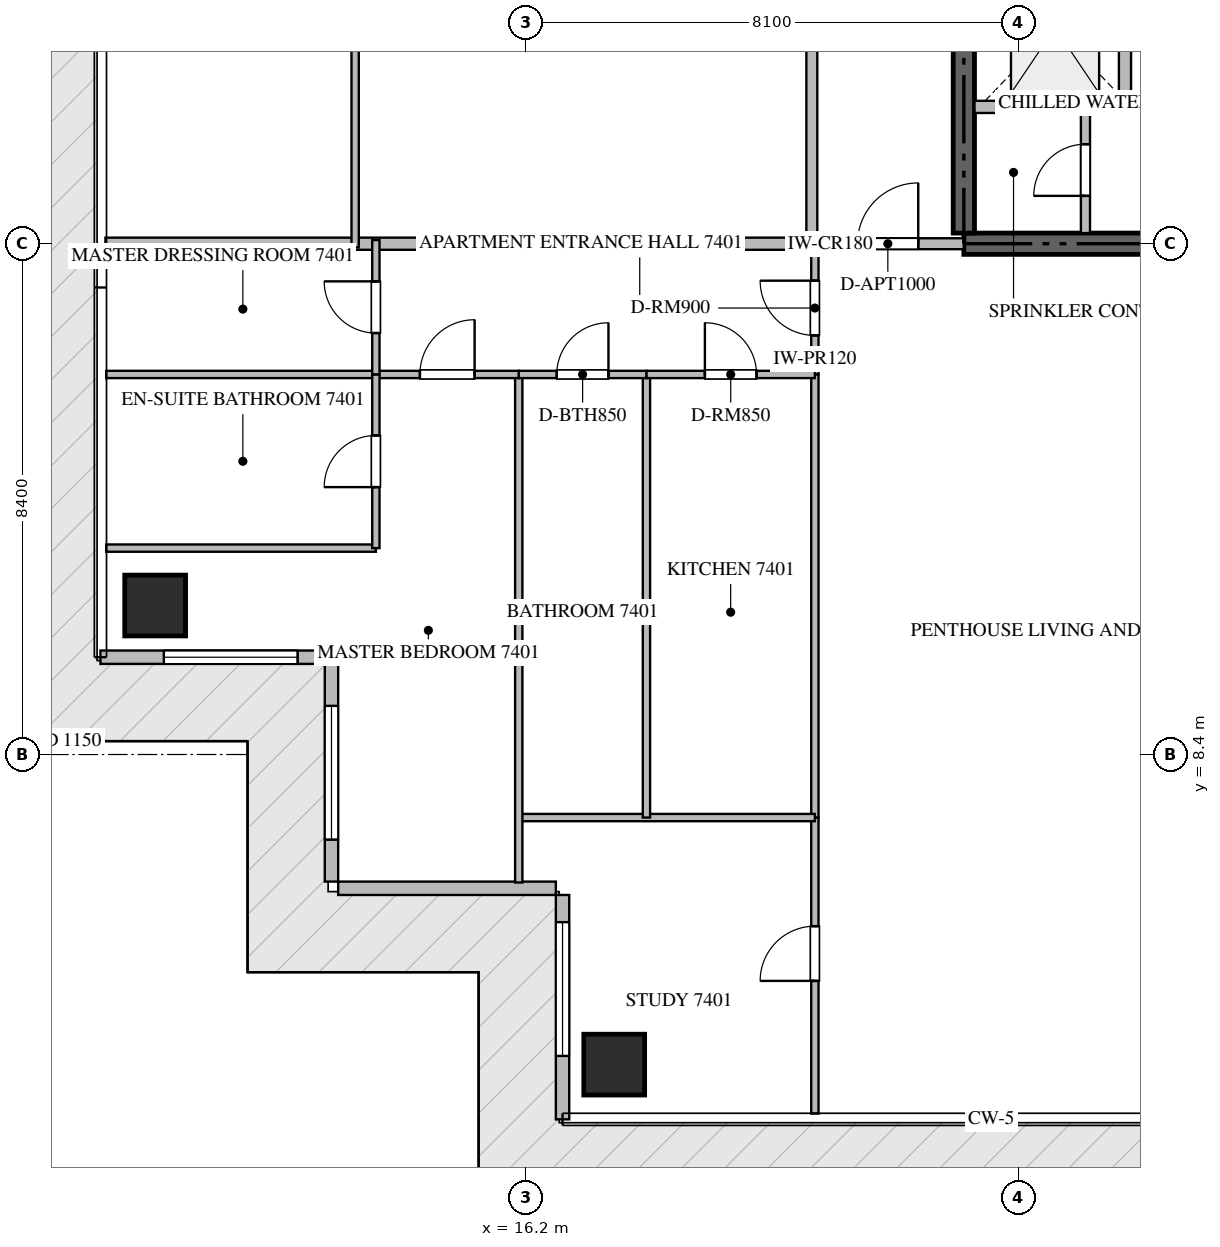
"""IFC4 building model, lengths in metres.
Left out: names, types, materials, properties, quantities, classifications, styles, units other than length and angle.
Written with IfcOpenShell. Run it as: python <this file> out.ifc"""

import sys

from ifc_helpers import new_model, si_unit, direction, frame, frame_2d, origin, origin_2d, place, context, subcontext, project, spatial, rectangle, extrude, source, transform, mapped, element, fill, save


model = new_model("IFC4")
c1 = context("Model", 3, precision=1e-05, world=origin(), true_north=direction((0.0, 1.0)))
c2 = subcontext(c1, "Body", "Model", "MODEL_VIEW")
j1 = project(units=[si_unit("LENGTHUNIT", "METRE"), si_unit("PLANEANGLEUNIT", "RADIAN")], contexts=[c1])
p1 = place(None, origin())
s1 = spatial("IfcSite", under=j1, at=p1, CompositionType="ELEMENT")
p2 = place(p1, origin())
s2 = spatial("IfcBuilding", under=s1, at=p2, CompositionType="ELEMENT")
p3 = place(p2, frame((0.0, 0.0, 297.5)))
s3 = spatial("IfcBuildingStorey", under=s2, at=p3, CompositionType="ELEMENT", Elevation=297.5)
p4 = place(p3, frame((23.4, 16.8, -0.26), z_axis=(0.0, 0.0, 1.0), x_axis=(1.0, 0.0, 0.0)))
e1 = element("IfcWall", 1, at=p4, inside=s3, PredefinedType="SHEAR", context=c2, shape_type="SweptSolid", body=[
    extrude(rectangle(XDim=18.0, YDim=0.35, at=frame_2d((9.0, 0.0))), origin(), (0.0, 0.0, 1.0), 4.048),
])
p5 = place(p3, frame((23.4, 16.975, -0.26), z_axis=(0.0, 0.0, 1.0), x_axis=(0.0, 1.0, 0.0)))
e2 = element("IfcWall", 2, at=p5, inside=s3, PredefinedType="SHEAR", context=c2, shape_type="SweptSolid", body=[
    extrude(rectangle(XDim=4.875, YDim=0.35, at=frame_2d((2.438, 0.0))), origin(), (0.0, 0.0, 1.0), 4.048),
])
m1 = source(origin(), c2, "Body", "SweptSolid", [
    extrude(rectangle(XDim=1.0, YDim=1.0, at=origin_2d()), origin(), (0.0, 0.0, 1.0), 4.05),
])
for number, where, z_axis, x_axis in (
    (3, (17.65, 3.3, -0.26), (0.0, 0.0, 1.0), (1.0, 0.0, 0.0)),
    (4, (10.1, 10.85, -0.26), (0.0, 0.0, 1.0), (1.0, 0.0, 0.0)),
):
    element("IfcColumn", number, at=place(p3, frame(where, z_axis=z_axis, x_axis=x_axis)), inside=s3, PredefinedType="COLUMN", context=c2, shape_type="MappedRepresentation", body=[
        mapped(m1, transform((0.0, 0.0, 0.0), scale=1.0)),
    ])
p6 = place(p3, frame((9.2, 10.0, 0.0), z_axis=(0.0, 0.0, 1.0), x_axis=(1.0, 0.0, 0.0)))
e5 = element("IfcWall", 5, at=p6, inside=s3, PredefinedType="ELEMENTEDWALL", context=c2, shape_type="SweptSolid", body=[
    extrude(rectangle(XDim=3.69, YDim=0.22, at=frame_2d((1.845, 0.0))), origin(), (0.0, 0.0, 1.0), 3.775),
])
p7 = place(p6, frame((1.043, 0.0, 0.65)))
e6 = element("IfcOpeningElement", 6, at=p7, cuts=e5, PredefinedType="OPENING", context=c2, shape_type="SweptSolid", body=[
    extrude(rectangle(XDim=2.2, YDim=2.4, at=frame_2d((1.1, 1.2))), frame((0.0, 0.12, 0.0), z_axis=(0.0, -1.0, 0.0), x_axis=(1.0, 0.0, 0.0)), (0.0, 0.0, 1.0), 0.24),
])
p8 = place(p3, frame((13.0, 9.89, 0.0), z_axis=(0.0, 0.0, 1.0), x_axis=(0.0, -1.0, 0.0)))
e7 = element("IfcWall", 7, at=p8, inside=s3, PredefinedType="ELEMENTEDWALL", context=c2, shape_type="SweptSolid", body=[
    extrude(rectangle(XDim=3.58, YDim=0.22, at=frame_2d((1.79, 0.0))), origin(), (0.0, 0.0, 1.0), 3.775),
])
p9 = place(p8, frame((0.69, 0.0, 0.65)))
e8 = element("IfcOpeningElement", 8, at=p9, cuts=e7, PredefinedType="OPENING", context=c2, shape_type="SweptSolid", body=[
    extrude(rectangle(XDim=2.2, YDim=2.4, at=frame_2d((1.1, 1.2))), frame((0.0, 0.12, 0.0), z_axis=(0.0, -1.0, 0.0), x_axis=(1.0, 0.0, 0.0)), (0.0, 0.0, 1.0), 0.24),
])
p10 = place(p3, frame((13.11, 6.2, 0.0), z_axis=(0.0, 0.0, 1.0), x_axis=(1.0, 0.0, 0.0)))
e9 = element("IfcWall", 9, at=p10, inside=s3, PredefinedType="ELEMENTEDWALL", context=c2, shape_type="SweptSolid", body=[
    extrude(rectangle(XDim=3.58, YDim=0.22, at=frame_2d((1.79, 0.0))), origin(), (0.0, 0.0, 1.0), 3.775),
])
p11 = place(p3, frame((16.8, 6.09, 0.0), z_axis=(0.0, 0.0, 1.0), x_axis=(0.0, -1.0, 0.0)))
e10 = element("IfcWall", 10, at=p11, inside=s3, PredefinedType="ELEMENTEDWALL", context=c2, shape_type="SweptSolid", body=[
    extrude(rectangle(XDim=3.69, YDim=0.22, at=frame_2d((1.845, 0.0))), origin(), (0.0, 0.0, 1.0), 3.775),
])
p12 = place(p11, frame((0.447, 0.0, 0.65)))
e11 = element("IfcOpeningElement", 11, at=p12, cuts=e10, PredefinedType="OPENING", context=c2, shape_type="SweptSolid", body=[
    extrude(rectangle(XDim=2.2, YDim=2.4, at=frame_2d((1.1, 1.2))), frame((0.0, 0.12, 0.0), z_axis=(0.0, -1.0, 0.0), x_axis=(1.0, 0.0, 0.0)), (0.0, 0.0, 1.0), 0.24),
])
p13 = place(p3, frame((26.05, 19.05, 0.0), z_axis=(0.0, 0.0, 1.0), x_axis=(0.0, 1.0, 0.0)))
e12 = element("IfcWall", 12, at=p13, inside=s3, PredefinedType="STANDARD", context=c2, shape_type="SweptSolid", body=[
    extrude(rectangle(XDim=2.5, YDim=0.2, at=frame_2d((1.25, 0.0))), origin(), (0.0, 0.0, 1.0), 3.79),
])
p14 = place(p3, frame((23.575, 19.05, 0.0), z_axis=(0.0, 0.0, 1.0), x_axis=(1.0, 0.0, 0.0)))
e13 = element("IfcWall", 13, at=p14, inside=s3, PredefinedType="STANDARD", context=c2, shape_type="SweptSolid", body=[
    extrude(rectangle(XDim=2.475, YDim=0.2, at=frame_2d((1.238, 0.0))), origin(), (0.0, 0.0, 1.0), 3.79),
])
p15 = place(p3, frame((25.4, 16.975, 0.0), z_axis=(0.0, 0.0, 1.0), x_axis=(0.0, 1.0, 0.0)))
e14 = element("IfcWall", 14, at=p15, inside=s3, PredefinedType="PARTITIONING", context=c2, shape_type="SweptSolid", body=[
    extrude(rectangle(XDim=2.075, YDim=0.15, at=frame_2d((1.038, 0.0))), origin(), (0.0, 0.0, 1.0), 3.79),
])
p16 = place(p15, frame((0.612, 0.0, 0.0)))
e15 = element("IfcOpeningElement", 15, at=p16, cuts=e14, PredefinedType="OPENING", context=c2, shape_type="SweptSolid", body=[
    extrude(rectangle(XDim=0.85, YDim=2.1, at=frame_2d((0.425, 1.05))), frame((0.0, 0.085, 0.0), z_axis=(0.0, -1.0, 0.0), x_axis=(1.0, 0.0, 0.0)), (0.0, 0.0, 1.0), 0.17),
])
p17 = place(p3, frame((9.282, 16.8, 0.0), z_axis=(0.0, 0.0, 1.0), x_axis=(1.0, 0.0, 0.0)))
e16 = element("IfcWall", 16, at=p17, inside=s3, PredefinedType="PARTITIONING", context=c2, shape_type="SweptSolid", body=[
    extrude(rectangle(XDim=11.618, YDim=0.2, at=frame_2d((5.809, 0.0))), origin(), (0.0, 0.0, 1.0), 3.79),
])
p18 = place(p3, frame((20.902, 16.8, 0.0), z_axis=(0.0, 0.0, 1.0), x_axis=(1.0, 0.0, 0.0)))
e17 = element("IfcWall", 17, at=p18, inside=s3, PredefinedType="PARTITIONING", context=c2, shape_type="SweptSolid", body=[
    extrude(rectangle(XDim=2.496, YDim=0.18, at=frame_2d((1.248, 0.0))), origin(), (0.0, 0.0, 1.0), 3.79),
])
p19 = place(p18, frame((0.748, 0.0, 0.0)))
e18 = element("IfcOpeningElement", 18, at=p19, cuts=e17, PredefinedType="OPENING", context=c2, shape_type="SweptSolid", body=[
    extrude(rectangle(XDim=1.0, YDim=2.15, at=frame_2d((0.5, 1.075))), frame((0.0, 0.1, 0.0), z_axis=(0.0, -1.0, 0.0), x_axis=(1.0, 0.0, 0.0)), (0.0, 0.0, 1.0), 0.2),
])
p20 = place(p3, frame((20.9, 16.8, 0.0), z_axis=(0.0, 0.0, 1.0), x_axis=(0.0, 1.0, 0.0)))
e19 = element("IfcWall", 19, at=p20, inside=s3, PredefinedType="PARTITIONING", context=c2, shape_type="SweptSolid", body=[
    extrude(rectangle(XDim=16.8, YDim=0.18, at=frame_2d((8.4, 0.0))), origin(), (0.0, 0.0, 1.0), 3.79),
])
p21 = place(p20, frame((14.5, 0.0, 0.0)))
e20 = element("IfcOpeningElement", 20, at=p21, cuts=e19, PredefinedType="OPENING", context=c2, shape_type="SweptSolid", body=[
    extrude(rectangle(XDim=1.0, YDim=2.15, at=frame_2d((0.5, 1.075))), frame((0.0, 0.1, 0.0), z_axis=(0.0, -1.0, 0.0), x_axis=(1.0, 0.0, 0.0)), (0.0, 0.0, 1.0), 0.2),
])
p22 = place(p3, frame((20.95, 14.65, 0.0), z_axis=(0.0, 0.0, 1.0), x_axis=(0.0, 1.0, 0.0)))
e21 = element("IfcWall", 21, at=p22, inside=s3, PredefinedType="PARTITIONING", context=c2, shape_type="SweptSolid", body=[
    extrude(rectangle(XDim=2.148, YDim=0.12, at=frame_2d((1.074, 0.0))), origin(), (0.0, 0.0, 1.0), 3.79),
])
p23 = place(p22, frame((0.642, 0.0, 0.0)))
e22 = element("IfcOpeningElement", 22, at=p23, cuts=e21, PredefinedType="OPENING", context=c2, shape_type="SweptSolid", body=[
    extrude(rectangle(XDim=0.9, YDim=2.1, at=frame_2d((0.45, 1.05))), frame((0.0, 0.07, 0.0), z_axis=(0.0, -1.0, 0.0), x_axis=(1.0, 0.0, 0.0)), (0.0, 0.0, 1.0), 0.14),
])
p24 = place(p3, frame((20.95, 2.495, 0.0), z_axis=(0.0, 0.0, 1.0), x_axis=(0.0, 1.0, 0.0)))
e23 = element("IfcWall", 23, at=p24, inside=s3, PredefinedType="PARTITIONING", context=c2, shape_type="SweptSolid", body=[
    extrude(rectangle(XDim=4.868, YDim=0.12, at=frame_2d((2.434, 0.0))), origin(), (0.0, 0.0, 1.0), 3.79),
])
p25 = place(p24, frame((2.182, 0.0, 0.0)))
e24 = element("IfcOpeningElement", 24, at=p25, cuts=e23, PredefinedType="OPENING", context=c2, shape_type="SweptSolid", body=[
    extrude(rectangle(XDim=0.9, YDim=2.1, at=frame_2d((0.45, 1.05))), frame((0.0, 0.07, 0.0), z_axis=(0.0, -1.0, 0.0), x_axis=(1.0, 0.0, 0.0)), (0.0, 0.0, 1.0), 0.14),
])
p26 = place(p3, frame((20.95, 7.365, 0.0), z_axis=(0.0, 0.0, 1.0), x_axis=(0.0, 1.0, 0.0)))
e25 = element("IfcWall", 25, at=p26, inside=s3, PredefinedType="PARTITIONING", context=c2, shape_type="SweptSolid", body=[
    extrude(rectangle(XDim=7.283, YDim=0.12, at=frame_2d((3.642, 0.0))), origin(), (0.0, 0.0, 1.0), 3.79),
])
p27 = place(p3, frame((16.08, 7.363, 0.0), z_axis=(0.0, 0.0, 1.0), x_axis=(1.0, 0.0, 0.0)))
e26 = element("IfcWall", 26, at=p27, inside=s3, PredefinedType="PARTITIONING", context=c2, shape_type="SweptSolid", body=[
    extrude(rectangle(XDim=4.87, YDim=0.12, at=frame_2d((2.435, 0.0))), origin(), (0.0, 0.0, 1.0), 3.79),
])
p28 = place(p3, frame((16.08, 6.295, 0.0), z_axis=(0.0, 0.0, 1.0), x_axis=(0.0, 1.0, 0.0)))
e27 = element("IfcWall", 27, at=p28, inside=s3, PredefinedType="PARTITIONING", context=c2, shape_type="SweptSolid", body=[
    extrude(rectangle(XDim=8.355, YDim=0.12, at=frame_2d((4.177, 0.0))), origin(), (0.0, 0.0, 1.0), 3.79),
])
p29 = place(p3, frame((18.18, 7.363, 0.0), z_axis=(0.0, 0.0, 1.0), x_axis=(0.0, 1.0, 0.0)))
e28 = element("IfcWall", 28, at=p29, inside=s3, PredefinedType="PARTITIONING", context=c2, shape_type="SweptSolid", body=[
    extrude(rectangle(XDim=7.287, YDim=0.12, at=frame_2d((3.644, 0.0))), origin(), (0.0, 0.0, 1.0), 3.79),
])
p30 = place(p3, frame((16.08, 14.65, 0.0), z_axis=(0.0, 0.0, 1.0), x_axis=(1.0, 0.0, 0.0)))
e29 = element("IfcWall", 29, at=p30, inside=s3, PredefinedType="PARTITIONING", context=c2, shape_type="SweptSolid", body=[
    extrude(rectangle(XDim=2.1, YDim=0.12, at=frame_2d((1.05, 0.0))), origin(), (0.0, 0.0, 1.0), 3.79),
])
p31 = place(p30, frame((0.625, 0.0, 0.0)))
e30 = element("IfcOpeningElement", 30, at=p31, cuts=e29, PredefinedType="OPENING", context=c2, shape_type="SweptSolid", body=[
    extrude(rectangle(XDim=0.85, YDim=2.1, at=frame_2d((0.425, 1.05))), frame((0.0, 0.07, 0.0), z_axis=(0.0, -1.0, 0.0), x_axis=(1.0, 0.0, 0.0)), (0.0, 0.0, 1.0), 0.14),
])
p32 = place(p3, frame((18.182, 14.65, 0.0), z_axis=(0.0, 0.0, 1.0), x_axis=(1.0, 0.0, 0.0)))
e31 = element("IfcWall", 31, at=p32, inside=s3, PredefinedType="PARTITIONING", context=c2, shape_type="SweptSolid", body=[
    extrude(rectangle(XDim=2.768, YDim=0.12, at=frame_2d((1.384, 0.0))), origin(), (0.0, 0.0, 1.0), 3.79),
])
p33 = place(p32, frame((0.959, 0.0, 0.0)))
e32 = element("IfcOpeningElement", 32, at=p33, cuts=e31, PredefinedType="OPENING", context=c2, shape_type="SweptSolid", body=[
    extrude(rectangle(XDim=0.85, YDim=2.1, at=frame_2d((0.425, 1.05))), frame((0.0, 0.07, 0.0), z_axis=(0.0, -1.0, 0.0), x_axis=(1.0, 0.0, 0.0)), (0.0, 0.0, 1.0), 0.14),
])
p34 = place(p3, frame((13.73, 14.65, 0.0), z_axis=(0.0, 0.0, 1.0), x_axis=(1.0, 0.0, 0.0)))
e33 = element("IfcWall", 33, at=p34, inside=s3, PredefinedType="PARTITIONING", context=c2, shape_type="SweptSolid", body=[
    extrude(rectangle(XDim=2.348, YDim=0.12, at=frame_2d((1.174, 0.0))), origin(), (0.0, 0.0, 1.0), 3.79),
])
p35 = place(p34, frame((0.724, 0.0, 0.0)))
e34 = element("IfcOpeningElement", 34, at=p35, cuts=e33, PredefinedType="OPENING", context=c2, shape_type="SweptSolid", body=[
    extrude(rectangle(XDim=0.9, YDim=2.1, at=frame_2d((0.45, 1.05))), frame((0.0, 0.07, 0.0), z_axis=(0.0, -1.0, 0.0), x_axis=(1.0, 0.0, 0.0)), (0.0, 0.0, 1.0), 0.14),
])
p36 = place(p3, frame((9.295, 11.794, 0.0), z_axis=(0.0, 0.0, 1.0), x_axis=(1.0, 0.0, 0.0)))
e35 = element("IfcWall", 35, at=p36, inside=s3, PredefinedType="PARTITIONING", context=c2, shape_type="SweptSolid", body=[
    extrude(rectangle(XDim=4.435, YDim=0.12, at=frame_2d((2.218, 0.0))), origin(), (0.0, 0.0, 1.0), 3.79),
])
p37 = place(p3, frame((9.295, 14.65, 0.0), z_axis=(0.0, 0.0, 1.0), x_axis=(1.0, 0.0, 0.0)))
e36 = element("IfcWall", 36, at=p37, inside=s3, PredefinedType="PARTITIONING", context=c2, shape_type="SweptSolid", body=[
    extrude(rectangle(XDim=4.433, YDim=0.12, at=frame_2d((2.217, 0.0))), origin(), (0.0, 0.0, 1.0), 3.79),
])
p38 = place(p3, frame((13.73, 11.794, 0.0), z_axis=(0.0, 0.0, 1.0), x_axis=(0.0, 1.0, 0.0)))
e37 = element("IfcWall", 37, at=p38, inside=s3, PredefinedType="PARTITIONING", context=c2, shape_type="SweptSolid", body=[
    extrude(rectangle(XDim=2.856, YDim=0.12, at=frame_2d((1.428, 0.0))), origin(), (0.0, 0.0, 1.0), 3.79),
])
p39 = place(p38, frame((1.003, 0.0, 0.0)))
e38 = element("IfcOpeningElement", 38, at=p39, cuts=e37, PredefinedType="OPENING", context=c2, shape_type="SweptSolid", body=[
    extrude(rectangle(XDim=0.85, YDim=2.1, at=frame_2d((0.425, 1.05))), frame((0.0, 0.07, 0.0), z_axis=(0.0, -1.0, 0.0), x_axis=(1.0, 0.0, 0.0)), (0.0, 0.0, 1.0), 0.14),
])
p40 = place(p3, frame((13.73, 14.652, 0.0), z_axis=(0.0, 0.0, 1.0), x_axis=(0.0, 1.0, 0.0)))
e39 = element("IfcWall", 39, at=p40, inside=s3, PredefinedType="PARTITIONING", context=c2, shape_type="SweptSolid", body=[
    extrude(rectangle(XDim=2.208, YDim=0.12, at=frame_2d((1.104, 0.0))), origin(), (0.0, 0.0, 1.0), 3.79),
])
p41 = place(p40, frame((0.679, 0.0, 0.0)))
e40 = element("IfcOpeningElement", 40, at=p41, cuts=e39, PredefinedType="OPENING", context=c2, shape_type="SweptSolid", body=[
    extrude(rectangle(XDim=0.85, YDim=2.1, at=frame_2d((0.425, 1.05))), frame((0.0, 0.07, 0.0), z_axis=(0.0, -1.0, 0.0), x_axis=(1.0, 0.0, 0.0)), (0.0, 0.0, 1.0), 0.14),
])
p42 = place(p3, frame((13.389, 16.74, 0.0), z_axis=(0.0, 0.0, 1.0), x_axis=(0.0, 1.0, 0.0)))
e41 = element("IfcWall", 41, at=p42, inside=s3, PredefinedType="PARTITIONING", context=c2, shape_type="SweptSolid", body=[
    extrude(rectangle(XDim=10.48, YDim=0.12, at=frame_2d((5.24, 0.0))), origin(), (0.0, 0.0, 1.0), 3.79),
])
m2 = source(origin(), c2, "Body", "SweptSolid", [
    extrude(rectangle(XDim=2.2, YDim=2.4, at=frame_2d((1.1, 1.2))), frame((0.0, 0.03, 0.0), z_axis=(0.0, -1.0, 0.0), x_axis=(1.0, 0.0, 0.0)), (0.0, 0.0, 1.0), 0.06),
])
p43 = place(p7, origin())
e42 = element("IfcWindow", 42, at=p43, inside=s3, PartitioningType="SINGLE_PANEL", PredefinedType="WINDOW", context=c2, shape_type="MappedRepresentation", body=[
    mapped(m2, transform((0.0, 0.0, 0.0), scale=1.0)),
])
fill(e6, e42)
p44 = place(p9, origin())
e43 = element("IfcWindow", 43, at=p44, inside=s3, PartitioningType="SINGLE_PANEL", PredefinedType="WINDOW", context=c2, shape_type="MappedRepresentation", body=[
    mapped(m2, transform((0.0, 0.0, 0.0), scale=1.0)),
])
fill(e8, e43)
p45 = place(p12, origin())
e44 = element("IfcWindow", 44, at=p45, inside=s3, PartitioningType="SINGLE_PANEL", PredefinedType="WINDOW", context=c2, shape_type="MappedRepresentation", body=[
    mapped(m2, transform((0.0, 0.0, 0.0), scale=1.0)),
])
fill(e11, e44)
m3 = source(origin(), c2, "Body", "SweptSolid", [
    extrude(rectangle(XDim=0.85, YDim=2.1, at=frame_2d((0.425, 1.05))), frame((0.0, 0.025, 0.0), z_axis=(0.0, -1.0, 0.0), x_axis=(1.0, 0.0, 0.0)), (0.0, 0.0, 1.0), 0.05),
])
p46 = place(p16, origin())
e45 = element("IfcDoor", 45, at=p46, inside=s3, OperationType="SINGLE_SWING_LEFT", PredefinedType="DOOR", context=c2, shape_type="MappedRepresentation", body=[
    mapped(m3, transform((0.0, 0.0, 0.0), scale=1.0)),
])
fill(e15, e45)
m4 = source(origin(), c2, "Body", "SweptSolid", [
    extrude(rectangle(XDim=1.0, YDim=2.15, at=frame_2d((0.5, 1.075))), frame((0.0, 0.025, 0.0), z_axis=(0.0, -1.0, 0.0), x_axis=(1.0, 0.0, 0.0)), (0.0, 0.0, 1.0), 0.05),
])
p47 = place(p19, origin())
e46 = element("IfcDoor", 46, at=p47, inside=s3, OperationType="SINGLE_SWING_RIGHT", PredefinedType="DOOR", context=c2, shape_type="MappedRepresentation", body=[
    mapped(m4, transform((0.0, 0.0, 0.0), scale=1.0)),
])
fill(e18, e46)
m5 = source(origin(), c2, "Body", "SweptSolid", [
    extrude(rectangle(XDim=0.9, YDim=2.1, at=frame_2d((0.45, 1.05))), frame((0.0, 0.025, 0.0), z_axis=(0.0, -1.0, 0.0), x_axis=(1.0, 0.0, 0.0)), (0.0, 0.0, 1.0), 0.05),
])
p48 = place(p23, origin())
e47 = element("IfcDoor", 47, at=p48, inside=s3, OperationType="SINGLE_SWING_RIGHT", PredefinedType="DOOR", context=c2, shape_type="MappedRepresentation", body=[
    mapped(m5, transform((0.0, 0.0, 0.0), scale=1.0)),
])
fill(e22, e47)
p49 = place(p25, origin())
e48 = element("IfcDoor", 48, at=p49, inside=s3, OperationType="SINGLE_SWING_LEFT", PredefinedType="DOOR", context=c2, shape_type="MappedRepresentation", body=[
    mapped(m5, transform((0.0, 0.0, 0.0), scale=1.0)),
])
fill(e24, e48)
p50 = place(p31, origin())
e49 = element("IfcDoor", 49, at=p50, inside=s3, OperationType="SINGLE_SWING_RIGHT", PredefinedType="DOOR", context=c2, shape_type="MappedRepresentation", body=[
    mapped(m3, transform((0.0, 0.0, 0.0), scale=1.0)),
])
fill(e30, e49)
p51 = place(p33, origin())
e50 = element("IfcDoor", 50, at=p51, inside=s3, OperationType="SINGLE_SWING_LEFT", PredefinedType="DOOR", context=c2, shape_type="MappedRepresentation", body=[
    mapped(m3, transform((0.0, 0.0, 0.0), scale=1.0)),
])
fill(e32, e50)
p52 = place(p35, origin())
e51 = element("IfcDoor", 51, at=p52, inside=s3, OperationType="SINGLE_SWING_RIGHT", PredefinedType="DOOR", context=c2, shape_type="MappedRepresentation", body=[
    mapped(m5, transform((0.0, 0.0, 0.0), scale=1.0)),
])
fill(e34, e51)
p53 = place(p39, origin())
e52 = element("IfcDoor", 52, at=p53, inside=s3, OperationType="SINGLE_SWING_LEFT", PredefinedType="DOOR", context=c2, shape_type="MappedRepresentation", body=[
    mapped(m3, transform((0.0, 0.0, 0.0), scale=1.0)),
])
fill(e38, e52)
p54 = place(p41, origin())
e53 = element("IfcDoor", 53, at=p54, inside=s3, OperationType="SINGLE_SWING_RIGHT", PredefinedType="DOOR", context=c2, shape_type="MappedRepresentation", body=[
    mapped(m3, transform((0.0, 0.0, 0.0), scale=1.0)),
])
fill(e40, e53)
save(model, sys.argv[1])
